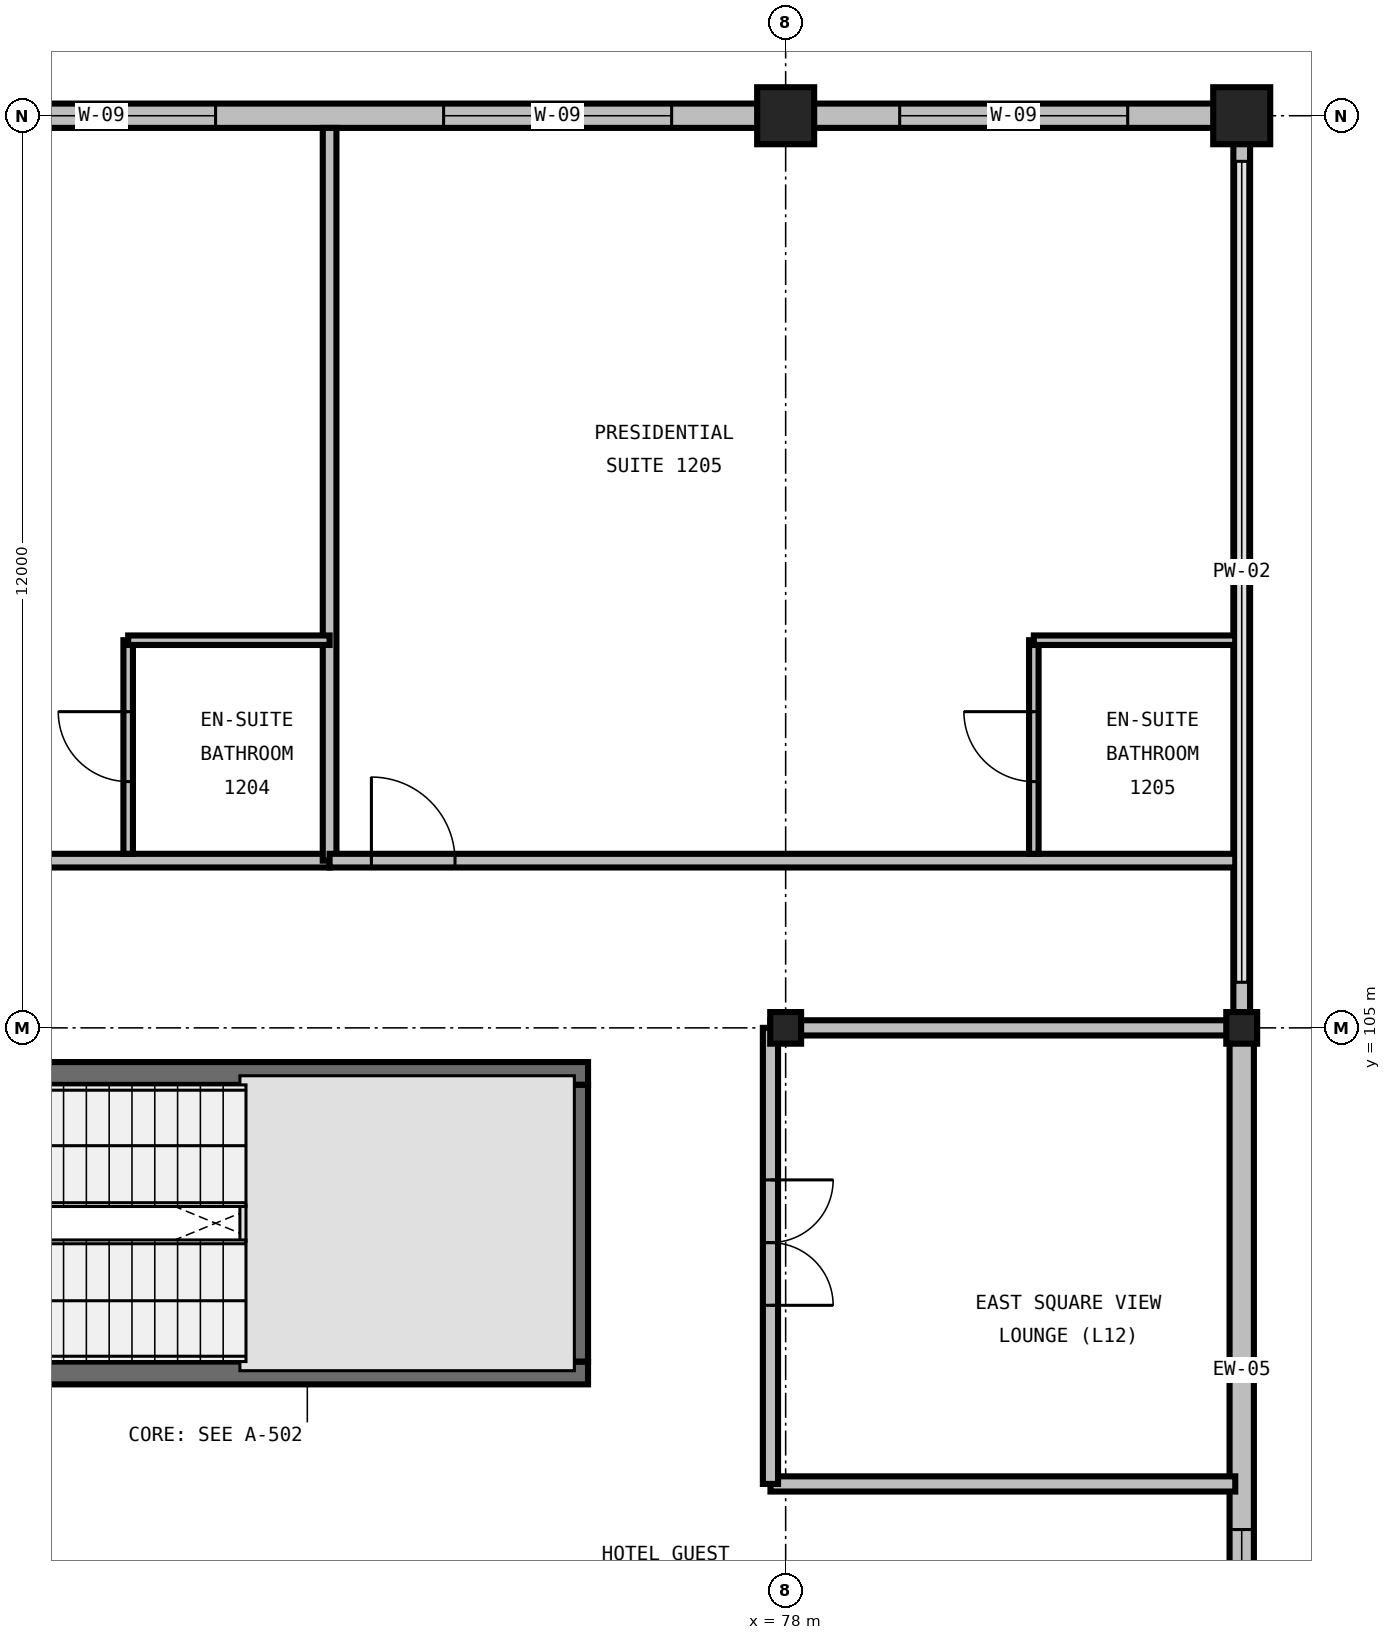
"""IFC4 building model, lengths in metres.
Left out: names, types, materials, properties, quantities, classifications, styles, units other than length and angle.
Written with IfcOpenShell. Run it as: python <this file> out.ifc"""

import sys

from ifc_helpers import new_model, si_unit, direction, frame, frame_2d, origin, origin_2d, place, context, subcontext, project, spatial, rectangle, i_section, extrude, element, fill, save


model = new_model("IFC4")
c1 = context("Model", 3, precision=1e-05, world=origin(), true_north=direction((0.0, 1.0)))
c2 = subcontext(c1, "Body", "Model", "MODEL_VIEW")
j1 = project(units=[si_unit("LENGTHUNIT", "METRE"), si_unit("PLANEANGLEUNIT", "RADIAN")], contexts=[c1])
p1 = place(None, origin())
s1 = spatial("IfcSite", under=j1, at=p1, CompositionType="ELEMENT")
p2 = place(p1, origin())
s2 = spatial("IfcBuilding", under=s1, at=p2, CompositionType="ELEMENT")
p3 = place(p2, frame((0.0, 0.0, 52.8)))
s3 = spatial("IfcBuildingStorey", under=s2, at=p3, CompositionType="ELEMENT", Elevation=52.8)
p4 = place(p3, frame((78.0, 105.0, 0.0), z_axis=(0.0, 0.0, 1.0), x_axis=(1.0, 0.0, 0.0)))
e1 = element("IfcColumn", 1, at=p4, inside=s3, PredefinedType="COLUMN", context=c2, shape_type="SweptSolid", body=[
    extrude(i_section(OverallWidth=0.406, OverallDepth=0.416, WebThickness=0.03, FlangeThickness=0.048, FilletRadius=0.031, at=origin_2d()), origin(), (0.0, 0.0, 1.0), 3.6),
])
p5 = place(p3, frame((78.0, 117.0, 0.0), z_axis=(0.0, 0.0, 1.0), x_axis=(1.0, 0.0, 0.0)))
e2 = element("IfcColumn", 2, at=p5, inside=s3, PredefinedType="COLUMN", context=c2, shape_type="SweptSolid", body=[
    extrude(rectangle(XDim=0.75, YDim=0.75, at=origin_2d()), origin(), (0.0, 0.0, 1.0), 3.6),
])
p6 = place(p3, frame((84.0, 105.0, 0.0), z_axis=(0.0, 0.0, 1.0), x_axis=(1.0, 0.0, 0.0)))
e3 = element("IfcColumn", 3, at=p6, inside=s3, PredefinedType="COLUMN", context=c2, shape_type="SweptSolid", body=[
    extrude(i_section(OverallWidth=0.406, OverallDepth=0.416, WebThickness=0.03, FlangeThickness=0.048, FilletRadius=0.031, at=origin_2d()), origin(), (0.0, 0.0, 1.0), 3.6),
])
p7 = place(p3, frame((84.0, 117.0, 0.0), z_axis=(0.0, 0.0, 1.0), x_axis=(1.0, 0.0, 0.0)))
e4 = element("IfcColumn", 4, at=p7, inside=s3, PredefinedType="COLUMN", context=c2, shape_type="SweptSolid", body=[
    extrude(rectangle(XDim=0.75, YDim=0.75, at=origin_2d()), origin(), (0.0, 0.0, 1.0), 3.6),
])
p8 = place(p3, frame((65.6, 100.46, 0.0), z_axis=(0.0, 0.0, 1.0), x_axis=(1.0, 0.0, 0.0)))
e5 = element("IfcWall", 5, at=p8, inside=s3, PredefinedType="SHEAR", context=c2, shape_type="SweptSolid", body=[
    extrude(rectangle(XDim=9.8, YDim=0.3, at=frame_2d((4.9, 0.0))), origin(), (0.0, 0.0, 1.0), 3.6),
])
p9 = place(p8, frame((0.45, 0.0, 0.0)))
e6 = element("IfcOpeningElement", 6, at=p9, cuts=e5, PredefinedType="OPENING", context=c2, shape_type="SweptSolid", body=[
    extrude(rectangle(XDim=1.1, YDim=2.2, at=frame_2d((0.55, 1.1))), frame((0.0, 0.165, 0.0), z_axis=(0.0, -1.0, 0.0), x_axis=(1.0, 0.0, 0.0)), (0.0, 0.0, 1.0), 0.33),
])
p10 = place(p3, frame((75.4, 104.4, 0.0), z_axis=(0.0, 0.0, 1.0), x_axis=(-1.0, 0.0, 0.0)))
e7 = element("IfcWall", 7, at=p10, inside=s3, PredefinedType="SHEAR", context=c2, shape_type="SweptSolid", body=[
    extrude(rectangle(XDim=9.8, YDim=0.3, at=frame_2d((4.9, 0.0))), origin(), (0.0, 0.0, 1.0), 3.6),
])
p11 = place(p3, frame((75.25, 100.61, 0.0), z_axis=(0.0, 0.0, 1.0), x_axis=(0.0, 1.0, 0.0)))
e8 = element("IfcWall", 8, at=p11, inside=s3, PredefinedType="SHEAR", context=c2, shape_type="SweptSolid", body=[
    extrude(rectangle(XDim=3.64, YDim=0.3, at=frame_2d((1.82, 0.0))), origin(), (0.0, 0.0, 1.0), 3.6),
])
p12 = place(p3, frame((78.0, 117.0, 0.0), z_axis=(0.0, 0.0, 1.0), x_axis=(-1.0, 0.0, 0.0)))
e9 = element("IfcWall", 9, at=p12, inside=s3, PredefinedType="STANDARD", context=c2, shape_type="SweptSolid", body=[
    extrude(rectangle(XDim=12.0, YDim=0.32, at=frame_2d((6.0, 0.0))), origin(), (0.0, 0.0, 1.0), 2.536),
])
p13 = place(p12, frame((1.5, 0.0, 0.7)))
e10 = element("IfcOpeningElement", 10, at=p13, cuts=e9, PredefinedType="OPENING", context=c2, shape_type="SweptSolid", body=[
    extrude(rectangle(XDim=3.0, YDim=1.71, at=frame_2d((1.5, 0.855))), frame((0.0, 0.175, 0.0), z_axis=(0.0, -1.0, 0.0), x_axis=(1.0, 0.0, 0.0)), (0.0, 0.0, 1.0), 0.35),
])
p14 = place(p12, frame((7.5, 0.0, 0.7)))
e11 = element("IfcOpeningElement", 11, at=p14, cuts=e9, PredefinedType="OPENING", context=c2, shape_type="SweptSolid", body=[
    extrude(rectangle(XDim=3.0, YDim=1.71, at=frame_2d((1.5, 0.855))), frame((0.0, 0.175, 0.0), z_axis=(0.0, -1.0, 0.0), x_axis=(1.0, 0.0, 0.0)), (0.0, 0.0, 1.0), 0.35),
])
p15 = place(p3, frame((84.0, 117.0, 0.0), z_axis=(0.0, 0.0, 1.0), x_axis=(-1.0, 0.0, 0.0)))
e12 = element("IfcWall", 12, at=p15, inside=s3, PredefinedType="STANDARD", context=c2, shape_type="SweptSolid", body=[
    extrude(rectangle(XDim=6.0, YDim=0.32, at=frame_2d((3.0, 0.0))), origin(), (0.0, 0.0, 1.0), 2.536),
])
p16 = place(p15, frame((1.5, 0.0, 0.7)))
e13 = element("IfcOpeningElement", 13, at=p16, cuts=e12, PredefinedType="OPENING", context=c2, shape_type="SweptSolid", body=[
    extrude(rectangle(XDim=3.0, YDim=1.71, at=frame_2d((1.5, 0.855))), frame((0.0, 0.175, 0.0), z_axis=(0.0, -1.0, 0.0), x_axis=(1.0, 0.0, 0.0)), (0.0, 0.0, 1.0), 0.35),
])
p17 = place(p3, frame((84.0, 96.0, 0.0), z_axis=(0.0, 0.0, 1.0), x_axis=(0.0, 1.0, 0.0)))
e14 = element("IfcWall", 14, at=p17, inside=s3, PredefinedType="STANDARD", context=c2, shape_type="SweptSolid", body=[
    extrude(rectangle(XDim=9.0, YDim=0.32, at=frame_2d((4.5, 0.0))), origin(), (0.0, 0.0, 1.0), 2.981),
])
p18 = place(p17, frame((0.6, 0.0, 0.85)))
e15 = element("IfcOpeningElement", 15, at=p18, cuts=e14, PredefinedType="OPENING", context=c2, shape_type="SweptSolid", body=[
    extrude(rectangle(XDim=1.8, YDim=1.5, at=frame_2d((0.9, 0.75))), frame((0.0, 0.175, 0.0), z_axis=(0.0, -1.0, 0.0), x_axis=(1.0, 0.0, 0.0)), (0.0, 0.0, 1.0), 0.35),
])
p19 = place(p3, frame((84.0, 105.0, 0.0), z_axis=(0.0, 0.0, 1.0), x_axis=(0.0, 1.0, 0.0)))
e16 = element("IfcWall", 16, at=p19, inside=s3, PredefinedType="PARAPET", context=c2, shape_type="SweptSolid", body=[
    extrude(rectangle(XDim=12.0, YDim=0.22, at=frame_2d((6.0, 0.0))), origin(), (0.0, 0.0, 1.0), 0.2),
])
p20 = place(p3, frame((60.0, 107.2, 0.0), z_axis=(0.0, 0.0, 1.0), x_axis=(1.0, 0.0, 0.0)))
e17 = element("IfcWall", 17, at=p20, inside=s3, PredefinedType="PARTITIONING", context=c2, shape_type="SweptSolid", body=[
    extrude(rectangle(XDim=12.0, YDim=0.18, at=frame_2d((6.0, 0.0))), origin(), (0.0, 0.0, 1.0), 3.29),
])
p21 = place(p20, frame((0.55, 0.0, 0.0)))
e18 = element("IfcOpeningElement", 18, at=p21, cuts=e17, PredefinedType="OPENING", context=c2, shape_type="SweptSolid", body=[
    extrude(rectangle(XDim=1.1, YDim=2.2, at=frame_2d((0.55, 1.1))), frame((0.0, 0.105, 0.0), z_axis=(0.0, -1.0, 0.0), x_axis=(1.0, 0.0, 0.0)), (0.0, 0.0, 1.0), 0.21),
])
p22 = place(p3, frame((72.0, 107.2, 0.0), z_axis=(0.0, 0.0, 1.0), x_axis=(0.0, 1.0, 0.0)))
e19 = element("IfcWall", 19, at=p22, inside=s3, PredefinedType="PARTITIONING", context=c2, shape_type="SweptSolid", body=[
    extrude(rectangle(XDim=9.64, YDim=0.18, at=frame_2d((4.82, 0.0))), origin(), (0.0, 0.0, 1.0), 3.29),
])
p23 = place(p3, frame((69.35, 107.29, 0.0), z_axis=(0.0, 0.0, 1.0), x_axis=(0.0, 1.0, 0.0)))
e20 = element("IfcWall", 20, at=p23, inside=s3, PredefinedType="PARTITIONING", context=c2, shape_type="SweptSolid", body=[
    extrude(rectangle(XDim=2.81, YDim=0.125, at=frame_2d((1.405, 0.0))), origin(), (0.0, 0.0, 1.0), 3.29),
])
p24 = place(p23, frame((0.95, 0.0, 0.0)))
e21 = element("IfcOpeningElement", 21, at=p24, cuts=e20, PredefinedType="OPENING", context=c2, shape_type="SweptSolid", body=[
    extrude(rectangle(XDim=0.92, YDim=2.1, at=frame_2d((0.46, 1.05))), frame((0.0, 0.077, 0.0), z_axis=(0.0, -1.0, 0.0), x_axis=(1.0, 0.0, 0.0)), (0.0, 0.0, 1.0), 0.155),
])
p25 = place(p3, frame((69.35, 110.1, 0.0), z_axis=(0.0, 0.0, 1.0), x_axis=(1.0, 0.0, 0.0)))
e22 = element("IfcWall", 22, at=p25, inside=s3, PredefinedType="PARTITIONING", context=c2, shape_type="SweptSolid", body=[
    extrude(rectangle(XDim=2.65, YDim=0.125, at=frame_2d((1.325, 0.0))), origin(), (0.0, 0.0, 1.0), 3.29),
])
p26 = place(p3, frame((72.0, 107.2, 0.0), z_axis=(0.0, 0.0, 1.0), x_axis=(1.0, 0.0, 0.0)))
e23 = element("IfcWall", 23, at=p26, inside=s3, PredefinedType="PARTITIONING", context=c2, shape_type="SweptSolid", body=[
    extrude(rectangle(XDim=11.915, YDim=0.18, at=frame_2d((5.957, 0.0))), origin(), (0.0, 0.0, 1.0), 3.29),
])
p27 = place(p26, frame((0.55, 0.0, 0.0)))
e24 = element("IfcOpeningElement", 24, at=p27, cuts=e23, PredefinedType="OPENING", context=c2, shape_type="SweptSolid", body=[
    extrude(rectangle(XDim=1.1, YDim=2.2, at=frame_2d((0.55, 1.1))), frame((0.0, 0.105, 0.0), z_axis=(0.0, -1.0, 0.0), x_axis=(1.0, 0.0, 0.0)), (0.0, 0.0, 1.0), 0.21),
])
p28 = place(p3, frame((81.265, 107.29, 0.0), z_axis=(0.0, 0.0, 1.0), x_axis=(0.0, 1.0, 0.0)))
e25 = element("IfcWall", 25, at=p28, inside=s3, PredefinedType="PARTITIONING", context=c2, shape_type="SweptSolid", body=[
    extrude(rectangle(XDim=2.81, YDim=0.125, at=frame_2d((1.405, 0.0))), origin(), (0.0, 0.0, 1.0), 3.29),
])
p29 = place(p28, frame((0.95, 0.0, 0.0)))
e26 = element("IfcOpeningElement", 26, at=p29, cuts=e25, PredefinedType="OPENING", context=c2, shape_type="SweptSolid", body=[
    extrude(rectangle(XDim=0.92, YDim=2.1, at=frame_2d((0.46, 1.05))), frame((0.0, 0.077, 0.0), z_axis=(0.0, -1.0, 0.0), x_axis=(1.0, 0.0, 0.0)), (0.0, 0.0, 1.0), 0.155),
])
p30 = place(p3, frame((81.265, 110.1, 0.0), z_axis=(0.0, 0.0, 1.0), x_axis=(1.0, 0.0, 0.0)))
e27 = element("IfcWall", 27, at=p30, inside=s3, PredefinedType="PARTITIONING", context=c2, shape_type="SweptSolid", body=[
    extrude(rectangle(XDim=2.65, YDim=0.125, at=frame_2d((1.325, 0.0))), origin(), (0.0, 0.0, 1.0), 3.29),
])
p31 = place(p3, frame((77.8, 99.0, 0.0), z_axis=(0.0, 0.0, 1.0), x_axis=(1.0, 0.0, 0.0)))
e28 = element("IfcWall", 28, at=p31, inside=s3, PredefinedType="PARTITIONING", context=c2, shape_type="SweptSolid", body=[
    extrude(rectangle(XDim=6.115, YDim=0.2, at=frame_2d((3.057, 0.0))), origin(), (0.0, 0.0, 1.0), 3.29),
])
p32 = place(p3, frame((83.915, 105.0, 0.0), z_axis=(0.0, 0.0, 1.0), x_axis=(-1.0, 0.0, 0.0)))
e29 = element("IfcWall", 29, at=p32, inside=s3, PredefinedType="PARTITIONING", context=c2, shape_type="SweptSolid", body=[
    extrude(rectangle(XDim=6.115, YDim=0.2, at=frame_2d((3.057, 0.0))), origin(), (0.0, 0.0, 1.0), 2.736),
])
p33 = place(p3, frame((77.8, 105.0, 0.0), z_axis=(0.0, 0.0, 1.0), x_axis=(0.0, -1.0, 0.0)))
e30 = element("IfcWall", 30, at=p33, inside=s3, PredefinedType="PARTITIONING", context=c2, shape_type="SweptSolid", body=[
    extrude(rectangle(XDim=6.0, YDim=0.2, at=frame_2d((3.0, 0.0))), origin(), (0.0, 0.0, 1.0), 3.29),
])
p34 = place(p33, frame((2.0, 0.0, 0.0)))
e31 = element("IfcOpeningElement", 31, at=p34, cuts=e30, PredefinedType="OPENING", context=c2, shape_type="SweptSolid", body=[
    extrude(rectangle(XDim=1.65, YDim=2.25, at=frame_2d((0.825, 1.125))), frame((0.0, 0.115, 0.0), z_axis=(0.0, -1.0, 0.0), x_axis=(1.0, 0.0, 0.0)), (0.0, 0.0, 1.0), 0.23),
])
p35 = place(p13, origin())
e32 = element("IfcWindow", 32, at=p35, inside=s3, PartitioningType="TRIPLE_PANEL_VERTICAL", PredefinedType="WINDOW", context=c2, shape_type="SweptSolid", body=[
    extrude(rectangle(XDim=3.0, YDim=1.71, at=frame_2d((1.5, 0.855))), frame((0.0, 0.03, 0.0), z_axis=(0.0, -1.0, 0.0), x_axis=(1.0, 0.0, 0.0)), (0.0, 0.0, 1.0), 0.06),
])
fill(e10, e32)
p36 = place(p14, origin())
e33 = element("IfcWindow", 33, at=p36, inside=s3, PartitioningType="TRIPLE_PANEL_VERTICAL", PredefinedType="WINDOW", context=c2, shape_type="SweptSolid", body=[
    extrude(rectangle(XDim=3.0, YDim=1.71, at=frame_2d((1.5, 0.855))), frame((0.0, 0.03, 0.0), z_axis=(0.0, -1.0, 0.0), x_axis=(1.0, 0.0, 0.0)), (0.0, 0.0, 1.0), 0.06),
])
fill(e11, e33)
p37 = place(p16, origin())
e34 = element("IfcWindow", 34, at=p37, inside=s3, PartitioningType="TRIPLE_PANEL_VERTICAL", PredefinedType="WINDOW", context=c2, shape_type="SweptSolid", body=[
    extrude(rectangle(XDim=3.0, YDim=1.71, at=frame_2d((1.5, 0.855))), frame((0.0, 0.03, 0.0), z_axis=(0.0, -1.0, 0.0), x_axis=(1.0, 0.0, 0.0)), (0.0, 0.0, 1.0), 0.06),
])
fill(e13, e34)
p38 = place(p18, origin())
e35 = element("IfcWindow", 35, at=p38, inside=s3, PartitioningType="SINGLE_PANEL", PredefinedType="WINDOW", context=c2, shape_type="SweptSolid", body=[
    extrude(rectangle(XDim=1.8, YDim=1.5, at=frame_2d((0.9, 0.75))), frame((0.0, 0.03, 0.0), z_axis=(0.0, -1.0, 0.0), x_axis=(1.0, 0.0, 0.0)), (0.0, 0.0, 1.0), 0.06),
])
fill(e15, e35)
p39 = place(p24, origin())
e36 = element("IfcDoor", 36, at=p39, inside=s3, OperationType="SINGLE_SWING_RIGHT", PredefinedType="DOOR", context=c2, shape_type="SweptSolid", body=[
    extrude(rectangle(XDim=0.92, YDim=2.1, at=frame_2d((0.46, 1.05))), frame((0.0, 0.025, 0.0), z_axis=(0.0, -1.0, 0.0), x_axis=(1.0, 0.0, 0.0)), (0.0, 0.0, 1.0), 0.05),
])
fill(e21, e36)
p40 = place(p27, origin())
e37 = element("IfcDoor", 37, at=p40, inside=s3, OperationType="SINGLE_SWING_LEFT", PredefinedType="DOOR", context=c2, shape_type="SweptSolid", body=[
    extrude(rectangle(XDim=1.1, YDim=2.2, at=frame_2d((0.55, 1.1))), frame((0.0, 0.025, 0.0), z_axis=(0.0, -1.0, 0.0), x_axis=(1.0, 0.0, 0.0)), (0.0, 0.0, 1.0), 0.05),
])
fill(e24, e37)
p41 = place(p29, origin())
e38 = element("IfcDoor", 38, at=p41, inside=s3, OperationType="SINGLE_SWING_RIGHT", PredefinedType="DOOR", context=c2, shape_type="SweptSolid", body=[
    extrude(rectangle(XDim=0.92, YDim=2.1, at=frame_2d((0.46, 1.05))), frame((0.0, 0.025, 0.0), z_axis=(0.0, -1.0, 0.0), x_axis=(1.0, 0.0, 0.0)), (0.0, 0.0, 1.0), 0.05),
])
fill(e26, e38)
p42 = place(p34, origin())
e39 = element("IfcDoor", 39, at=p42, inside=s3, OperationType="DOUBLE_DOOR_SINGLE_SWING", PredefinedType="DOOR", context=c2, shape_type="SweptSolid", body=[
    extrude(rectangle(XDim=1.65, YDim=2.25, at=frame_2d((0.825, 1.125))), frame((0.0, 0.025, 0.0), z_axis=(0.0, -1.0, 0.0), x_axis=(1.0, 0.0, 0.0)), (0.0, 0.0, 1.0), 0.05),
])
fill(e31, e39)
save(model, sys.argv[1])
